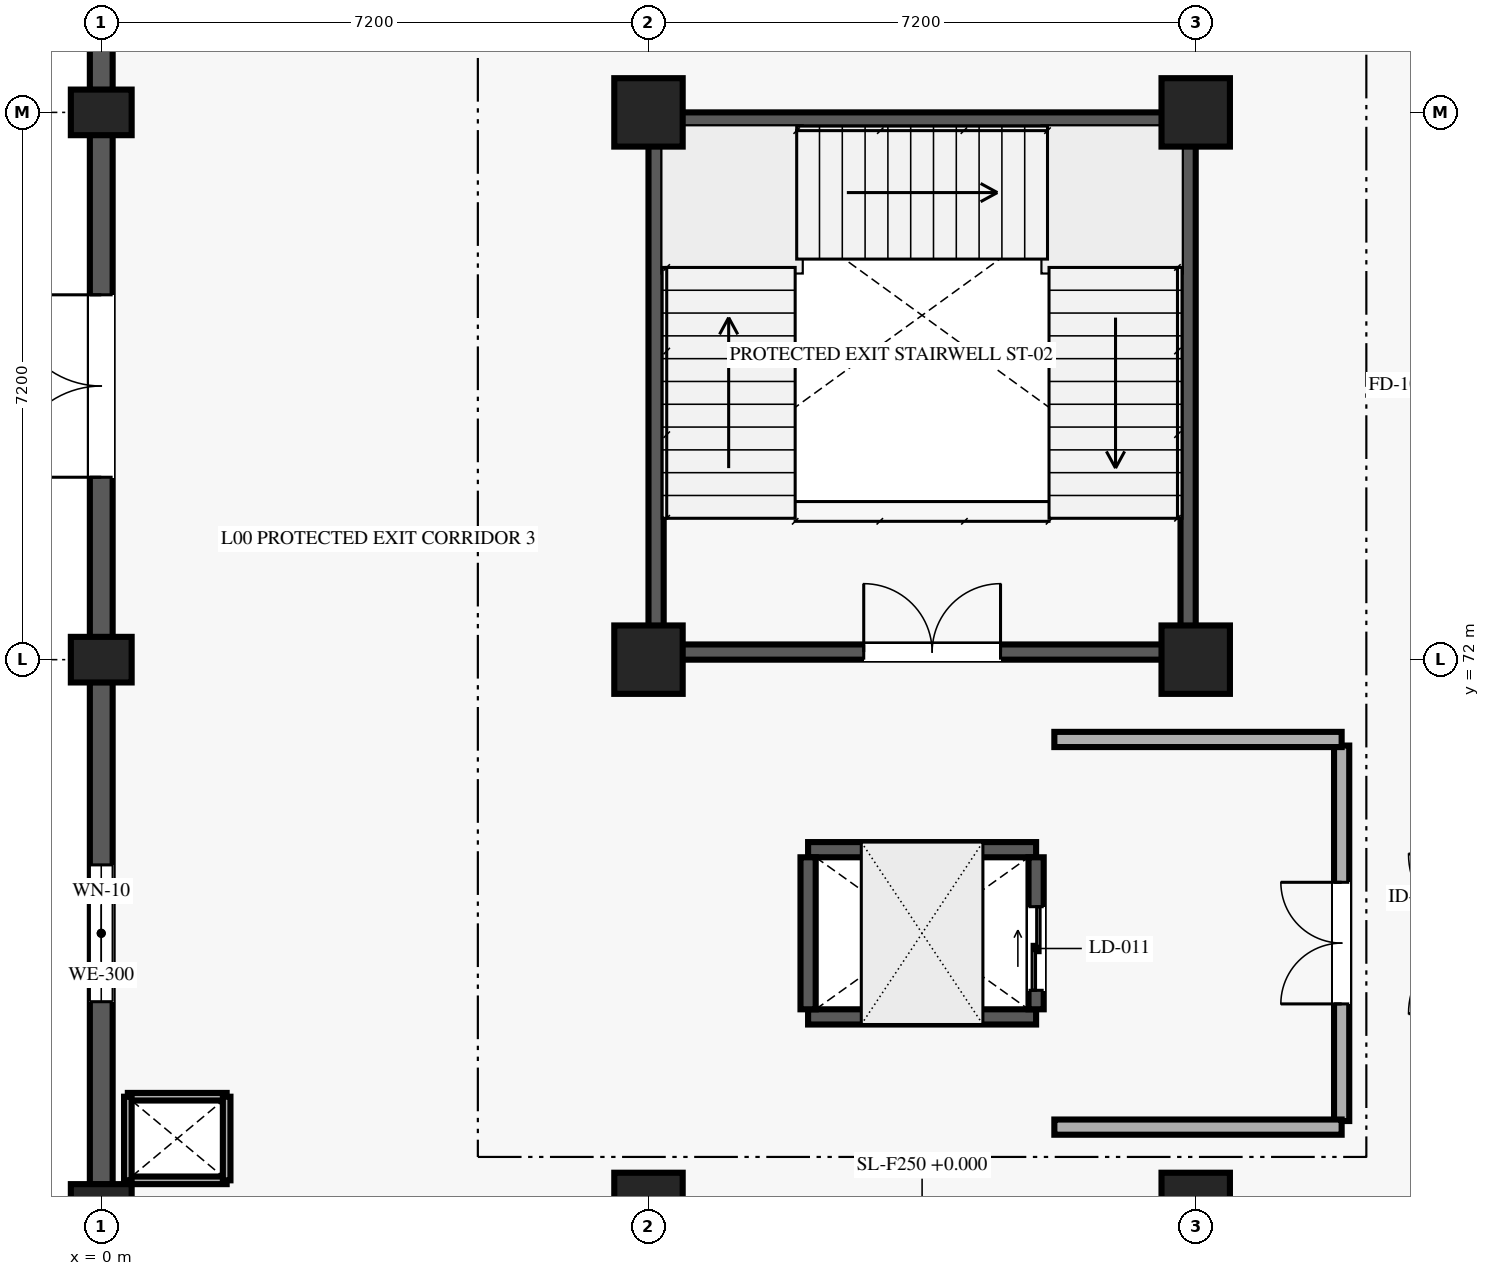
"""IFC4 building model, lengths in metres.
Left out: names, types, materials, properties, quantities, classifications, styles, units other than length and angle.
Written with IfcOpenShell. Run it as: python <this file> out.ifc"""

import sys

from ifc_helpers import new_model, si_unit, direction, frame, frame_2d, origin, origin_2d, place, context, subcontext, project, spatial, rectangle, extrude, element, fill, save


model = new_model("IFC4")
c1 = context("Model", 3, precision=1e-05, world=origin(), true_north=direction((0.0, 1.0)))
c2 = subcontext(c1, "Body", "Model", "MODEL_VIEW")
j1 = project(units=[si_unit("LENGTHUNIT", "METRE"), si_unit("PLANEANGLEUNIT", "RADIAN")], contexts=[c1])
p1 = place(None, origin())
s1 = spatial("IfcSite", under=j1, at=p1, CompositionType="ELEMENT")
p2 = place(p1, origin())
s2 = spatial("IfcBuilding", under=s1, at=p2, CompositionType="ELEMENT")
p3 = place(p2, origin())
s3 = spatial("IfcBuildingStorey", under=s2, at=p3, CompositionType="ELEMENT", Elevation=0.0)
for number, where, z_axis, x_axis in (
    (1, (0.0, 64.8, 0.0), (0.0, 0.0, 1.0), (0.0, 1.0, 0.0)),
    (2, (0.0, 72.0, 0.0), (0.0, 0.0, 1.0), (0.0, 1.0, 0.0)),
    (3, (0.0, 79.2, 0.0), (0.0, 0.0, 1.0), (0.0, 1.0, 0.0)),
):
    element("IfcColumn", number, at=place(p3, frame(where, z_axis=z_axis, x_axis=x_axis)), inside=s3, PredefinedType="COLUMN", context=c2, shape_type="SweptSolid", body=[
        extrude(rectangle(XDim=0.6, YDim=0.8, at=origin_2d()), origin(), (0.0, 0.0, 1.0), 5.4),
    ])
for number, where, z_axis, x_axis in (
    (4, (7.2, 64.8, 0.0), (0.0, 0.0, 1.0), (1.0, 0.0, 0.0)),
    (5, (7.2, 72.0, 0.0), (0.0, 0.0, 1.0), (1.0, 0.0, 0.0)),
    (6, (7.2, 79.2, 0.0), (0.0, 0.0, 1.0), (1.0, 0.0, 0.0)),
    (7, (14.4, 64.8, 0.0), (0.0, 0.0, 1.0), (1.0, 0.0, 0.0)),
    (8, (14.4, 72.0, 0.0), (0.0, 0.0, 1.0), (1.0, 0.0, 0.0)),
    (9, (14.4, 79.2, 0.0), (0.0, 0.0, 1.0), (1.0, 0.0, 0.0)),
):
    element("IfcColumn", number, at=place(p3, frame(where, z_axis=z_axis, x_axis=x_axis)), inside=s3, PredefinedType="COLUMN", context=c2, shape_type="SweptSolid", body=[
        extrude(rectangle(XDim=0.9, YDim=0.9, at=origin_2d()), origin(), (0.0, 0.0, 1.0), 5.4),
    ])
p4 = place(p3, frame((0.0, 65.095, 0.0), z_axis=(0.0, 0.0, 1.0), x_axis=(0.0, 1.0, 0.0)))
e10 = element("IfcWall", 10, at=p4, inside=s3, PredefinedType="SOLIDWALL", context=c2, shape_type="SweptSolid", body=[
    extrude(rectangle(XDim=6.61, YDim=0.3, at=frame_2d((3.305, 0.0))), origin(), (0.0, 0.0, 1.0), 5.16),
])
p5 = place(p4, frame((2.405, 0.0, 0.85)))
e11 = element("IfcOpeningElement", 11, at=p5, cuts=e10, PredefinedType="OPENING", context=c2, shape_type="SweptSolid", body=[
    extrude(rectangle(XDim=1.8, YDim=1.6, at=frame_2d((0.9, 0.8))), frame((0.0, 0.16, 0.0), z_axis=(0.0, -1.0, 0.0), x_axis=(1.0, 0.0, 0.0)), (0.0, 0.0, 1.0), 0.32),
])
p6 = place(p3, frame((0.0, 72.295, 0.0), z_axis=(0.0, 0.0, 1.0), x_axis=(0.0, 1.0, 0.0)))
e12 = element("IfcWall", 12, at=p6, inside=s3, PredefinedType="SOLIDWALL", context=c2, shape_type="SweptSolid", body=[
    extrude(rectangle(XDim=6.61, YDim=0.3, at=frame_2d((3.305, 0.0))), origin(), (0.0, 0.0, 1.0), 5.16),
])
p7 = place(p6, frame((2.105, 0.0, 0.0)))
e13 = element("IfcOpeningElement", 13, at=p7, cuts=e12, PredefinedType="OPENING", context=c2, shape_type="SweptSolid", body=[
    extrude(rectangle(XDim=2.4, YDim=2.6, at=frame_2d((1.2, 1.3))), frame((0.0, 0.16, 0.0), z_axis=(0.0, -1.0, 0.0), x_axis=(1.0, 0.0, 0.0)), (0.0, 0.0, 1.0), 0.32),
])
p8 = place(p3, frame((0.0, 79.495, 0.0), z_axis=(0.0, 0.0, 1.0), x_axis=(0.0, 1.0, 0.0)))
e14 = element("IfcWall", 14, at=p8, inside=s3, PredefinedType="SOLIDWALL", context=c2, shape_type="SweptSolid", body=[
    extrude(rectangle(XDim=3.085, YDim=0.3, at=frame_2d((1.542, 0.0))), origin(), (0.0, 0.0, 1.0), 5.16),
])
p9 = place(p8, frame((0.843, 0.0, 0.85)))
e15 = element("IfcOpeningElement", 15, at=p9, cuts=e14, PredefinedType="OPENING", context=c2, shape_type="SweptSolid", body=[
    extrude(rectangle(XDim=1.4, YDim=1.6, at=frame_2d((0.7, 0.8))), frame((0.0, 0.16, 0.0), z_axis=(0.0, -1.0, 0.0), x_axis=(1.0, 0.0, 0.0)), (0.0, 0.0, 1.0), 0.32),
])
p10 = place(p3, frame((7.4, 72.1, 0.0), z_axis=(0.0, 0.0, 1.0), x_axis=(1.0, 0.0, 0.0)))
e16 = element("IfcWall", 16, at=p10, inside=s3, PredefinedType="SHEAR", context=c2, shape_type="SweptSolid", body=[
    extrude(rectangle(XDim=6.8, YDim=0.2, at=frame_2d((3.4, 0.0))), origin(), (0.0, 0.0, 1.0), 5.16),
])
p11 = place(p10, frame((2.632, 0.0, 0.0)))
e17 = element("IfcOpeningElement", 17, at=p11, cuts=e16, PredefinedType="OPENING", context=c2, shape_type="SweptSolid", body=[
    extrude(rectangle(XDim=1.8, YDim=2.2, at=frame_2d((0.9, 1.1))), frame((0.0, 0.11, 0.0), z_axis=(0.0, -1.0, 0.0), x_axis=(1.0, 0.0, 0.0)), (0.0, 0.0, 1.0), 0.22),
])
for number, where, z_axis, x_axis in (
    (18, (7.4, 79.1, 0.0), (0.0, 0.0, 1.0), (1.0, 0.0, 0.0)),
    (19, (7.3, 72.2, 0.0), (0.0, 0.0, 1.0), (0.0, 1.0, 0.0)),
    (20, (14.3, 72.2, 0.0), (0.0, 0.0, 1.0), (0.0, 1.0, 0.0)),
):
    element("IfcWall", number, at=place(p3, frame(where, z_axis=z_axis, x_axis=x_axis)), inside=s3, PredefinedType="SHEAR", context=c2, shape_type="SweptSolid", body=[
        extrude(rectangle(XDim=6.8, YDim=0.2, at=frame_2d((3.4, 0.0))), origin(), (0.0, 0.0, 1.0), 5.16),
    ])
for number, where, z_axis, x_axis in (
    (21, (9.3, 67.3, 0.0), (0.0, 0.0, 1.0), (1.0, 0.0, 0.0)),
    (22, (9.3, 69.5, 0.0), (0.0, 0.0, 1.0), (1.0, 0.0, 0.0)),
):
    element("IfcWall", number, at=place(p3, frame(where, z_axis=z_axis, x_axis=x_axis)), inside=s3, PredefinedType="SHEAR", context=c2, shape_type="SweptSolid", body=[
        extrude(rectangle(XDim=3.0, YDim=0.2, at=frame_2d((1.5, 0.0))), origin(), (0.0, 0.0, 1.0), 5.16),
    ])
p12 = place(p3, frame((9.3, 67.4, 0.0), z_axis=(0.0, 0.0, 1.0), x_axis=(0.0, 1.0, 0.0)))
e23 = element("IfcWall", 23, at=p12, inside=s3, PredefinedType="SHEAR", context=c2, shape_type="SweptSolid", body=[
    extrude(rectangle(XDim=2.0, YDim=0.2, at=frame_2d((1.0, 0.0))), origin(), (0.0, 0.0, 1.0), 5.16),
])
p13 = place(p3, frame((12.3, 67.4, 0.0), z_axis=(0.0, 0.0, 1.0), x_axis=(0.0, 1.0, 0.0)))
e24 = element("IfcWall", 24, at=p13, inside=s3, PredefinedType="SHEAR", context=c2, shape_type="SweptSolid", body=[
    extrude(rectangle(XDim=2.0, YDim=0.2, at=frame_2d((1.0, 0.0))), origin(), (0.0, 0.0, 1.0), 5.16),
])
p14 = place(p13, frame((0.25, 0.0, 0.0)))
e25 = element("IfcOpeningElement", 25, at=p14, cuts=e24, PredefinedType="OPENING", context=c2, shape_type="SweptSolid", body=[
    extrude(rectangle(XDim=1.1, YDim=2.15, at=frame_2d((0.55, 1.075))), frame((0.0, 0.11, 0.0), z_axis=(0.0, -1.0, 0.0), x_axis=(1.0, 0.0, 0.0)), (0.0, 0.0, 1.0), 0.22),
])
p15 = place(p3, frame((0.35, 65.15, 0.0), z_axis=(0.0, 0.0, 1.0), x_axis=(1.0, 0.0, 0.0)))
e26 = element("IfcWall", 26, at=p15, inside=s3, PredefinedType="PARTITIONING", context=c2, shape_type="SweptSolid", body=[
    extrude(rectangle(XDim=1.3, YDim=0.1, at=frame_2d((0.65, 0.0))), origin(), (0.0, 0.0, 1.0), 4.5),
])
p16 = place(p3, frame((0.35, 66.25, 0.0), z_axis=(0.0, 0.0, 1.0), x_axis=(1.0, 0.0, 0.0)))
e27 = element("IfcWall", 27, at=p16, inside=s3, PredefinedType="PARTITIONING", context=c2, shape_type="SweptSolid", body=[
    extrude(rectangle(XDim=1.3, YDim=0.1, at=frame_2d((0.65, 0.0))), origin(), (0.0, 0.0, 1.0), 5.16),
])
p17 = place(p3, frame((0.35, 65.15, 0.0), z_axis=(0.0, 0.0, 1.0), x_axis=(0.0, 1.0, 0.0)))
e28 = element("IfcWall", 28, at=p17, inside=s3, PredefinedType="PARTITIONING", context=c2, shape_type="SweptSolid", body=[
    extrude(rectangle(XDim=1.1, YDim=0.1, at=frame_2d((0.55, 0.0))), origin(), (0.0, 0.0, 1.0), 4.45),
])
p18 = place(p3, frame((1.65, 65.15, 0.0), z_axis=(0.0, 0.0, 1.0), x_axis=(0.0, 1.0, 0.0)))
e29 = element("IfcWall", 29, at=p18, inside=s3, PredefinedType="PARTITIONING", context=c2, shape_type="SweptSolid", body=[
    extrude(rectangle(XDim=1.1, YDim=0.1, at=frame_2d((0.55, 0.0))), origin(), (0.0, 0.0, 1.0), 5.16),
])
p19 = place(p3, frame((16.32, 65.93, 0.0), z_axis=(0.0, 0.0, 1.0), x_axis=(0.0, 1.0, 0.0)))
e30 = element("IfcWall", 30, at=p19, inside=s3, PredefinedType="SOLIDWALL", context=c2, shape_type="SweptSolid", body=[
    extrude(rectangle(XDim=4.94, YDim=0.2, at=frame_2d((2.47, 0.0))), origin(), (0.0, 0.0, 1.0), 5.16),
])
p20 = place(p19, frame((1.541, 0.0, 0.0)))
e31 = element("IfcOpeningElement", 31, at=p20, cuts=e30, PredefinedType="OPENING", context=c2, shape_type="SweptSolid", body=[
    extrude(rectangle(XDim=1.6, YDim=2.2, at=frame_2d((0.8, 1.1))), frame((0.0, 0.11, 0.0), z_axis=(0.0, -1.0, 0.0), x_axis=(1.0, 0.0, 0.0)), (0.0, 0.0, 1.0), 0.22),
])
for number, where, z_axis, x_axis in (
    (32, (12.54, 65.85, 0.0), (0.0, 0.0, 1.0), (1.0, 0.0, 0.0)),
    (33, (12.54, 70.95, 0.0), (0.0, 0.0, 1.0), (1.0, 0.0, 0.0)),
):
    element("IfcWall", number, at=place(p3, frame(where, z_axis=z_axis, x_axis=x_axis)), inside=s3, PredefinedType="SOLIDWALL", context=c2, shape_type="SweptSolid", body=[
        extrude(rectangle(XDim=3.78, YDim=0.2, at=frame_2d((1.89, 0.0))), origin(), (0.0, 0.0, 1.0), 5.16),
    ])
p21 = place(p5, origin())
e34 = element("IfcWindow", 34, at=p21, inside=s3, PartitioningType="SINGLE_PANEL", PredefinedType="WINDOW", context=c2, shape_type="SweptSolid", body=[
    extrude(rectangle(XDim=1.8, YDim=1.6, at=frame_2d((0.9, 0.8))), frame((0.0, 0.03, 0.0), z_axis=(0.0, -1.0, 0.0), x_axis=(1.0, 0.0, 0.0)), (0.0, 0.0, 1.0), 0.06),
])
fill(e11, e34)
p22 = place(p7, origin())
e35 = element("IfcDoor", 35, at=p22, inside=s3, OperationType="DOUBLE_DOOR_SINGLE_SWING", PredefinedType="DOOR", context=c2, shape_type="SweptSolid", body=[
    extrude(rectangle(XDim=2.4, YDim=2.6, at=frame_2d((1.2, 1.3))), frame((0.0, 0.025, 0.0), z_axis=(0.0, -1.0, 0.0), x_axis=(1.0, 0.0, 0.0)), (0.0, 0.0, 1.0), 0.05),
])
fill(e13, e35)
p23 = place(p11, origin())
e36 = element("IfcDoor", 36, at=p23, inside=s3, OperationType="DOUBLE_DOOR_SINGLE_SWING", PredefinedType="DOOR", context=c2, shape_type="SweptSolid", body=[
    extrude(rectangle(XDim=1.8, YDim=2.2, at=frame_2d((0.9, 1.1))), frame((0.0, 0.025, 0.0), z_axis=(0.0, -1.0, 0.0), x_axis=(1.0, 0.0, 0.0)), (0.0, 0.0, 1.0), 0.05),
])
fill(e17, e36)
p24 = place(p14, origin())
e37 = element("IfcDoor", 37, at=p24, inside=s3, OperationType="DOUBLE_DOOR_SLIDING", PredefinedType="DOOR", context=c2, shape_type="SweptSolid", body=[
    extrude(rectangle(XDim=1.1, YDim=2.15, at=frame_2d((0.55, 1.075))), frame((0.0, 0.025, 0.0), z_axis=(0.0, -1.0, 0.0), x_axis=(1.0, 0.0, 0.0)), (0.0, 0.0, 1.0), 0.05),
])
fill(e25, e37)
p25 = place(p20, origin())
e38 = element("IfcDoor", 38, at=p25, inside=s3, OperationType="DOUBLE_DOOR_SINGLE_SWING", PredefinedType="DOOR", context=c2, shape_type="SweptSolid", body=[
    extrude(rectangle(XDim=1.6, YDim=2.2, at=frame_2d((0.8, 1.1))), frame((0.0, 0.025, 0.0), z_axis=(0.0, -1.0, 0.0), x_axis=(1.0, 0.0, 0.0)), (0.0, 0.0, 1.0), 0.05),
])
fill(e31, e38)
save(model, sys.argv[1])
